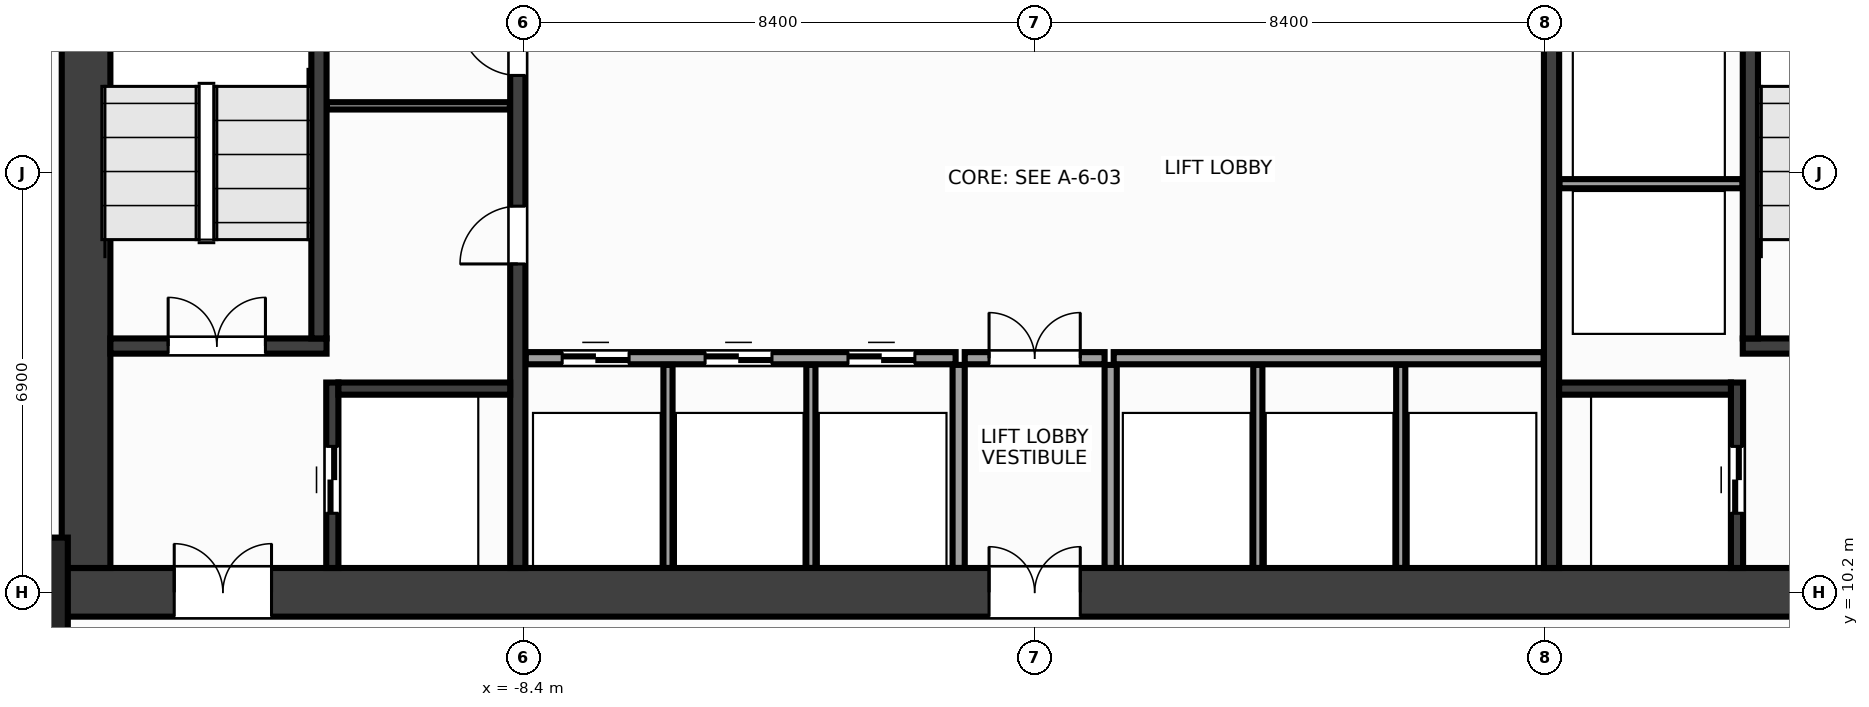
"""IFC4 building model, lengths in metres.
Left out: names, types, materials, properties, quantities, classifications, styles, units other than length and angle.
Written with IfcOpenShell. Run it as: python <this file> out.ifc"""

import sys

from ifc_helpers import new_model, si_unit, direction, frame, frame_2d, origin, origin_2d, place, context, subcontext, project, spatial, rectangle, extrude, source, transform, mapped, element, fill, save


model = new_model("IFC4")
c1 = context("Model", 3, precision=1e-05, world=origin(), true_north=direction((0.0, 1.0)))
c2 = subcontext(c1, "Body", "Model", "MODEL_VIEW")
j1 = project(units=[si_unit("LENGTHUNIT", "METRE"), si_unit("PLANEANGLEUNIT", "RADIAN")], contexts=[c1])
p1 = place(None, origin())
s1 = spatial("IfcSite", under=j1, at=p1, CompositionType="ELEMENT")
p2 = place(p1, origin())
s2 = spatial("IfcBuilding", under=s1, at=p2, CompositionType="ELEMENT")
p3 = place(p2, frame((0.0, 0.0, 59.6)))
s3 = spatial("IfcBuildingStorey", under=s2, at=p3, CompositionType="ELEMENT", Elevation=59.6)
m1 = source(origin(), c2, "Body", "SweptSolid", [
    extrude(rectangle(XDim=32.0, YDim=0.8, at=frame_2d((16.0, 0.0))), origin(), (0.0, 0.0, 1.0), 3.6),
])
p4 = place(p3, frame((-16.0, 10.2, 0.0), z_axis=(0.0, 0.0, 1.0), x_axis=(1.0, 0.0, 0.0)))
e1 = element("IfcWall", 1, at=p4, inside=s3, PredefinedType="SHEAR", context=c2, shape_type="MappedRepresentation", body=[
    mapped(m1, transform((0.0, 0.0, 0.0), x_axis=(1.0, 0.0, 0.0), y_axis=(0.0, 1.0, 0.0), z_axis=(0.0, 0.0, 1.0), scale=1.0)),
])
p5 = place(p4, frame((1.85, 0.0, 0.0)))
e2 = element("IfcOpeningElement", 2, at=p5, cuts=e1, PredefinedType="OPENING", context=c2, shape_type="SweptSolid", body=[
    extrude(rectangle(XDim=1.6, YDim=2.15, at=frame_2d((0.8, 1.075))), frame((0.0, 0.412, 0.0), z_axis=(0.0, -1.0, 0.0), x_axis=(1.0, 0.0, 0.0)), (0.0, 0.0, 1.0), 0.824),
])
p6 = place(p4, frame((28.55, 0.0, 0.0)))
e3 = element("IfcOpeningElement", 3, at=p6, cuts=e1, PredefinedType="OPENING", context=c2, shape_type="SweptSolid", body=[
    extrude(rectangle(XDim=1.6, YDim=2.15, at=frame_2d((0.8, 1.075))), frame((0.0, 0.412, 0.0), z_axis=(0.0, -1.0, 0.0), x_axis=(1.0, 0.0, 0.0)), (0.0, 0.0, 1.0), 0.824),
])
p7 = place(p4, frame((15.25, 0.0, 0.0)))
e4 = element("IfcOpeningElement", 4, at=p7, cuts=e1, PredefinedType="OPENING", context=c2, shape_type="SweptSolid", body=[
    extrude(rectangle(XDim=1.5, YDim=2.2, at=frame_2d((0.75, 1.1))), frame((0.0, 0.412, 0.0), z_axis=(0.0, -1.0, 0.0), x_axis=(1.0, 0.0, 0.0)), (0.0, 0.0, 1.0), 0.824),
])
m2 = source(origin(), c2, "Body", "SweptSolid", [
    extrude(rectangle(XDim=12.8, YDim=0.8, at=frame_2d((6.4, 0.0))), origin(), (0.0, 0.0, 1.0), 3.6),
])
p8 = place(p3, frame((-15.6, 10.6, 0.0), z_axis=(0.0, 0.0, 1.0), x_axis=(0.0, 1.0, 0.0)))
e5 = element("IfcWall", 5, at=p8, inside=s3, PredefinedType="SHEAR", context=c2, shape_type="MappedRepresentation", body=[
    mapped(m2, transform((0.0, 0.0, 0.0), x_axis=(1.0, 0.0, 0.0), y_axis=(0.0, 1.0, 0.0), z_axis=(0.0, 0.0, 1.0), scale=1.0)),
])
m3 = source(origin(), c2, "Body", "SweptSolid", [
    extrude(rectangle(XDim=12.8, YDim=0.25, at=frame_2d((6.4, 0.0))), origin(), (0.0, 0.0, 1.0), 3.6),
])
p9 = place(p3, frame((-8.5, 10.6, 0.0), z_axis=(0.0, 0.0, 1.0), x_axis=(0.0, 1.0, 0.0)))
e6 = element("IfcWall", 6, at=p9, inside=s3, PredefinedType="SHEAR", context=c2, shape_type="MappedRepresentation", body=[
    mapped(m3, transform((0.0, 0.0, 0.0), x_axis=(1.0, 0.0, 0.0), y_axis=(0.0, 1.0, 0.0), z_axis=(0.0, 0.0, 1.0), scale=1.0)),
])
p10 = place(p9, frame((5.0, 0.0, 0.0)))
e7 = element("IfcOpeningElement", 7, at=p10, cuts=e6, PredefinedType="OPENING", context=c2, shape_type="SweptSolid", body=[
    extrude(rectangle(XDim=0.95, YDim=2.15, at=frame_2d((0.475, 1.075))), frame((0.0, 0.137, 0.0), z_axis=(0.0, -1.0, 0.0), x_axis=(1.0, 0.0, 0.0)), (0.0, 0.0, 1.0), 0.274),
])
p11 = place(p9, frame((8.1, 0.0, 0.0)))
e8 = element("IfcOpeningElement", 8, at=p11, cuts=e6, PredefinedType="OPENING", context=c2, shape_type="SweptSolid", body=[
    extrude(rectangle(XDim=0.95, YDim=2.15, at=frame_2d((0.475, 1.075))), frame((0.0, 0.137, 0.0), z_axis=(0.0, -1.0, 0.0), x_axis=(1.0, 0.0, 0.0)), (0.0, 0.0, 1.0), 0.274),
])
p12 = place(p3, frame((8.5, 10.6, 0.0), z_axis=(0.0, 0.0, 1.0), x_axis=(0.0, 1.0, 0.0)))
e9 = element("IfcWall", 9, at=p12, inside=s3, PredefinedType="SHEAR", context=c2, shape_type="MappedRepresentation", body=[
    mapped(m3, transform((0.0, 0.0, 0.0), x_axis=(1.0, 0.0, 0.0), y_axis=(0.0, 1.0, 0.0), z_axis=(0.0, 0.0, 1.0), scale=1.0)),
])
p13 = place(p12, frame((9.85, 0.0, 0.0)))
e10 = element("IfcOpeningElement", 10, at=p13, cuts=e9, PredefinedType="OPENING", context=c2, shape_type="SweptSolid", body=[
    extrude(rectangle(XDim=0.95, YDim=2.15, at=frame_2d((0.475, 1.075))), frame((0.0, 0.137, 0.0), z_axis=(0.0, -1.0, 0.0), x_axis=(1.0, 0.0, 0.0)), (0.0, 0.0, 1.0), 0.274),
])
m4 = source(origin(), c2, "Body", "SweptSolid", [
    extrude(rectangle(XDim=3.555, YDim=0.25, at=frame_2d((1.777, 0.0))), origin(), (0.0, 0.0, 1.0), 3.6),
])
p14 = place(p3, frame((-15.2, 14.25, 0.0), z_axis=(0.0, 0.0, 1.0), x_axis=(1.0, 0.0, 0.0)))
e11 = element("IfcWall", 11, at=p14, inside=s3, PredefinedType="SHEAR", context=c2, shape_type="MappedRepresentation", body=[
    mapped(m4, transform((0.0, 0.0, 0.0), x_axis=(1.0, 0.0, 0.0), y_axis=(0.0, 1.0, 0.0), z_axis=(0.0, 0.0, 1.0), scale=1.0)),
])
p15 = place(p14, frame((0.95, 0.0, 0.0)))
e12 = element("IfcOpeningElement", 12, at=p15, cuts=e11, PredefinedType="OPENING", context=c2, shape_type="SweptSolid", body=[
    extrude(rectangle(XDim=1.6, YDim=2.15, at=frame_2d((0.8, 1.075))), frame((0.0, 0.137, 0.0), z_axis=(0.0, -1.0, 0.0), x_axis=(1.0, 0.0, 0.0)), (0.0, 0.0, 1.0), 0.274),
])
m5 = source(origin(), c2, "Body", "SweptSolid", [
    extrude(rectangle(XDim=9.025, YDim=0.25, at=frame_2d((4.512, 0.0))), origin(), (0.0, 0.0, 1.0), 3.6),
])
p16 = place(p3, frame((-11.77, 14.375, 0.0), z_axis=(0.0, 0.0, 1.0), x_axis=(0.0, 1.0, 0.0)))
e13 = element("IfcWall", 13, at=p16, inside=s3, PredefinedType="SHEAR", context=c2, shape_type="MappedRepresentation", body=[
    mapped(m5, transform((0.0, 0.0, 0.0), x_axis=(1.0, 0.0, 0.0), y_axis=(0.0, 1.0, 0.0), z_axis=(0.0, 0.0, 1.0), scale=1.0)),
])
p17 = place(p3, frame((11.645, 14.25, 0.0), z_axis=(0.0, 0.0, 1.0), x_axis=(1.0, 0.0, 0.0)))
e14 = element("IfcWall", 14, at=p17, inside=s3, PredefinedType="SHEAR", context=c2, shape_type="MappedRepresentation", body=[
    mapped(m4, transform((0.0, 0.0, 0.0), x_axis=(1.0, 0.0, 0.0), y_axis=(0.0, 1.0, 0.0), z_axis=(0.0, 0.0, 1.0), scale=1.0)),
])
p18 = place(p17, frame((0.95, 0.0, 0.0)))
e15 = element("IfcOpeningElement", 15, at=p18, cuts=e14, PredefinedType="OPENING", context=c2, shape_type="SweptSolid", body=[
    extrude(rectangle(XDim=1.6, YDim=2.15, at=frame_2d((0.8, 1.075))), frame((0.0, 0.137, 0.0), z_axis=(0.0, -1.0, 0.0), x_axis=(1.0, 0.0, 0.0)), (0.0, 0.0, 1.0), 0.274),
])
p19 = place(p3, frame((11.77, 14.375, 0.0), z_axis=(0.0, 0.0, 1.0), x_axis=(0.0, 1.0, 0.0)))
e16 = element("IfcWall", 16, at=p19, inside=s3, PredefinedType="SHEAR", context=c2, shape_type="MappedRepresentation", body=[
    mapped(m5, transform((0.0, 0.0, 0.0), x_axis=(1.0, 0.0, 0.0), y_axis=(0.0, 1.0, 0.0), z_axis=(0.0, 0.0, 1.0), scale=1.0)),
])
m6 = source(origin(), c2, "Body", "SweptSolid", [
    extrude(rectangle(XDim=3.05, YDim=0.2, at=frame_2d((1.525, 0.0))), origin(), (0.0, 0.0, 1.0), 3.6),
])
p20 = place(p3, frame((-11.55, 10.6, 0.0), z_axis=(0.0, 0.0, 1.0), x_axis=(0.0, 1.0, 0.0)))
e17 = element("IfcWall", 17, at=p20, inside=s3, PredefinedType="SHEAR", context=c2, shape_type="MappedRepresentation", body=[
    mapped(m6, transform((0.0, 0.0, 0.0), x_axis=(1.0, 0.0, 0.0), y_axis=(0.0, 1.0, 0.0), z_axis=(0.0, 0.0, 1.0), scale=1.0)),
])
p21 = place(p20, frame((0.9, 0.0, 0.0)))
e18 = element("IfcOpeningElement", 18, at=p21, cuts=e17, PredefinedType="OPENING", context=c2, shape_type="SweptSolid", body=[
    extrude(rectangle(XDim=1.1, YDim=2.15, at=frame_2d((0.55, 1.075))), frame((0.0, 0.112, 0.0), z_axis=(0.0, -1.0, 0.0), x_axis=(1.0, 0.0, 0.0)), (0.0, 0.0, 1.0), 0.224),
])
m7 = source(origin(), c2, "Body", "SweptSolid", [
    extrude(rectangle(XDim=2.825, YDim=0.2, at=frame_2d((1.413, 0.0))), origin(), (0.0, 0.0, 1.0), 3.6),
])
p22 = place(p3, frame((-11.45, 13.55, 0.0), z_axis=(0.0, 0.0, 1.0), x_axis=(1.0, 0.0, 0.0)))
e19 = element("IfcWall", 19, at=p22, inside=s3, PredefinedType="SHEAR", context=c2, shape_type="MappedRepresentation", body=[
    mapped(m7, transform((0.0, 0.0, 0.0), x_axis=(1.0, 0.0, 0.0), y_axis=(0.0, 1.0, 0.0), z_axis=(0.0, 0.0, 1.0), scale=1.0)),
])
p23 = place(p3, frame((11.55, 10.6, 0.0), z_axis=(0.0, 0.0, 1.0), x_axis=(0.0, 1.0, 0.0)))
e20 = element("IfcWall", 20, at=p23, inside=s3, PredefinedType="SHEAR", context=c2, shape_type="MappedRepresentation", body=[
    mapped(m6, transform((0.0, 0.0, 0.0), x_axis=(1.0, 0.0, 0.0), y_axis=(0.0, 1.0, 0.0), z_axis=(0.0, 0.0, 1.0), scale=1.0)),
])
p24 = place(p23, frame((0.9, 0.0, 0.0)))
e21 = element("IfcOpeningElement", 21, at=p24, cuts=e20, PredefinedType="OPENING", context=c2, shape_type="SweptSolid", body=[
    extrude(rectangle(XDim=1.1, YDim=2.15, at=frame_2d((0.55, 1.075))), frame((0.0, 0.112, 0.0), z_axis=(0.0, -1.0, 0.0), x_axis=(1.0, 0.0, 0.0)), (0.0, 0.0, 1.0), 0.224),
])
p25 = place(p3, frame((8.625, 13.55, 0.0), z_axis=(0.0, 0.0, 1.0), x_axis=(1.0, 0.0, 0.0)))
e22 = element("IfcWall", 22, at=p25, inside=s3, PredefinedType="SHEAR", context=c2, shape_type="MappedRepresentation", body=[
    mapped(m7, transform((0.0, 0.0, 0.0), x_axis=(1.0, 0.0, 0.0), y_axis=(0.0, 1.0, 0.0), z_axis=(0.0, 0.0, 1.0), scale=1.0)),
])
m8 = source(origin(), c2, "Body", "SweptSolid", [
    extrude(rectangle(XDim=1.8, YDim=1.8, at=origin_2d()), origin(), (0.0, 0.0, 1.0), 3.6),
])
p26 = place(p3, frame((-16.8, 10.2, 0.0), z_axis=(0.0, 0.0, 1.0), x_axis=(1.0, 0.0, 0.0)))
e23 = element("IfcColumn", 23, at=p26, inside=s3, PredefinedType="COLUMN", context=c2, shape_type="MappedRepresentation", body=[
    mapped(m8, transform((0.0, 0.0, 0.0), x_axis=(1.0, 0.0, 0.0), y_axis=(0.0, 1.0, 0.0), z_axis=(0.0, 0.0, 1.0), scale=1.0)),
])
m9 = source(origin(), c2, "Body", "SweptSolid", [
    extrude(rectangle(XDim=3.01, YDim=0.12, at=frame_2d((1.505, 0.0))), origin(), (0.0, 0.0, 1.0), 3.36),
])
p27 = place(p3, frame((-11.64, 18.2, 0.0), z_axis=(0.0, 0.0, 1.0), x_axis=(1.0, 0.0, 0.0)))
e24 = element("IfcWall", 24, at=p27, inside=s3, PredefinedType="PARTITIONING", context=c2, shape_type="MappedRepresentation", body=[
    mapped(m9, transform((0.0, 0.0, 0.0), x_axis=(1.0, 0.0, 0.0), y_axis=(0.0, 1.0, 0.0), z_axis=(0.0, 0.0, 1.0), scale=1.0)),
])
m10 = source(origin(), c2, "Body", "SweptSolid", [
    extrude(rectangle(XDim=3.01, YDim=0.15, at=frame_2d((1.505, 0.0))), origin(), (0.0, 0.0, 1.0), 3.36),
])
p28 = place(p3, frame((8.63, 16.92, 0.0), z_axis=(0.0, 0.0, 1.0), x_axis=(1.0, 0.0, 0.0)))
e25 = element("IfcWall", 25, at=p28, inside=s3, PredefinedType="PARTITIONING", context=c2, shape_type="MappedRepresentation", body=[
    mapped(m10, transform((0.0, 0.0, 0.0), x_axis=(1.0, 0.0, 0.0), y_axis=(0.0, 1.0, 0.0), z_axis=(0.0, 0.0, 1.0), scale=1.0)),
])
m11 = source(origin(), c2, "Body", "SweptSolid", [
    extrude(rectangle(XDim=7.07, YDim=0.2, at=frame_2d((3.535, 0.0))), origin(), (0.0, 0.0, 1.0), 3.36),
])
p29 = place(p3, frame((-8.37, 14.05, 0.0), z_axis=(0.0, 0.0, 1.0), x_axis=(1.0, 0.0, 0.0)))
e26 = element("IfcWall", 26, at=p29, inside=s3, PredefinedType="PARTITIONING", context=c2, shape_type="MappedRepresentation", body=[
    mapped(m11, transform((0.0, 0.0, 0.0), x_axis=(1.0, 0.0, 0.0), y_axis=(0.0, 1.0, 0.0), z_axis=(0.0, 0.0, 1.0), scale=1.0)),
])
p30 = place(p29, frame((0.6, 0.0, 0.0)))
e27 = element("IfcOpeningElement", 27, at=p30, cuts=e26, PredefinedType="OPENING", context=c2, shape_type="SweptSolid", body=[
    extrude(rectangle(XDim=1.1, YDim=2.15, at=frame_2d((0.55, 1.075))), frame((0.0, 0.112, 0.0), z_axis=(0.0, -1.0, 0.0), x_axis=(1.0, 0.0, 0.0)), (0.0, 0.0, 1.0), 0.224),
])
p31 = place(p29, frame((2.95, 0.0, 0.0)))
e28 = element("IfcOpeningElement", 28, at=p31, cuts=e26, PredefinedType="OPENING", context=c2, shape_type="SweptSolid", body=[
    extrude(rectangle(XDim=1.1, YDim=2.15, at=frame_2d((0.55, 1.075))), frame((0.0, 0.112, 0.0), z_axis=(0.0, -1.0, 0.0), x_axis=(1.0, 0.0, 0.0)), (0.0, 0.0, 1.0), 0.224),
])
p32 = place(p29, frame((5.3, 0.0, 0.0)))
e29 = element("IfcOpeningElement", 29, at=p32, cuts=e26, PredefinedType="OPENING", context=c2, shape_type="SweptSolid", body=[
    extrude(rectangle(XDim=1.1, YDim=2.15, at=frame_2d((0.55, 1.075))), frame((0.0, 0.112, 0.0), z_axis=(0.0, -1.0, 0.0), x_axis=(1.0, 0.0, 0.0)), (0.0, 0.0, 1.0), 0.224),
])
p33 = place(p3, frame((1.3, 14.05, 0.0), z_axis=(0.0, 0.0, 1.0), x_axis=(1.0, 0.0, 0.0)))
e30 = element("IfcWall", 30, at=p33, inside=s3, PredefinedType="PARTITIONING", context=c2, shape_type="MappedRepresentation", body=[
    mapped(m11, transform((0.0, 0.0, 0.0), x_axis=(1.0, 0.0, 0.0), y_axis=(0.0, 1.0, 0.0), z_axis=(0.0, 0.0, 1.0), scale=1.0)),
])
m12 = source(origin(), c2, "Body", "SweptSolid", [
    extrude(rectangle(XDim=3.34, YDim=0.2, at=frame_2d((1.67, 0.0))), origin(), (0.0, 0.0, 1.0), 3.36),
])
for number, where, z_axis, x_axis in (
    (31, (-1.25, 10.6, 0.0), (0.0, 0.0, 1.0), (0.0, 1.0, 0.0)),
    (32, (1.25, 10.6, 0.0), (0.0, 0.0, 1.0), (0.0, 1.0, 0.0)),
):
    element("IfcWall", number, at=place(p3, frame(where, z_axis=z_axis, x_axis=x_axis)), inside=s3, PredefinedType="PARTITIONING", context=c2, shape_type="MappedRepresentation", body=[
        mapped(m12, transform((0.0, 0.0, 0.0), x_axis=(1.0, 0.0, 0.0), y_axis=(0.0, 1.0, 0.0), z_axis=(0.0, 0.0, 1.0), scale=1.0)),
    ])
m13 = source(origin(), c2, "Body", "SweptSolid", [
    extrude(rectangle(XDim=2.3, YDim=0.2, at=frame_2d((1.15, 0.0))), origin(), (0.0, 0.0, 1.0), 3.36),
])
p34 = place(p3, frame((-1.15, 14.05, 0.0), z_axis=(0.0, 0.0, 1.0), x_axis=(1.0, 0.0, 0.0)))
e33 = element("IfcWall", 33, at=p34, inside=s3, PredefinedType="PARTITIONING", context=c2, shape_type="MappedRepresentation", body=[
    mapped(m13, transform((0.0, 0.0, 0.0), x_axis=(1.0, 0.0, 0.0), y_axis=(0.0, 1.0, 0.0), z_axis=(0.0, 0.0, 1.0), scale=1.0)),
])
p35 = place(p34, frame((0.4, 0.0, 0.0)))
e34 = element("IfcOpeningElement", 34, at=p35, cuts=e33, PredefinedType="OPENING", context=c2, shape_type="SweptSolid", body=[
    extrude(rectangle(XDim=1.5, YDim=2.2, at=frame_2d((0.75, 1.1))), frame((0.0, 0.112, 0.0), z_axis=(0.0, -1.0, 0.0), x_axis=(1.0, 0.0, 0.0)), (0.0, 0.0, 1.0), 0.224),
])
m14 = source(origin(), c2, "Body", "SweptSolid", [
    extrude(rectangle(XDim=3.34, YDim=0.15, at=frame_2d((1.67, 0.0))), origin(), (0.0, 0.0, 1.0), 3.36),
])
for number, where, z_axis, x_axis in (
    (35, (-6.03, 10.6, 0.0), (0.0, 0.0, 1.0), (0.0, 1.0, 0.0)),
    (36, (-3.68, 10.6, 0.0), (0.0, 0.0, 1.0), (0.0, 1.0, 0.0)),
    (37, (3.67, 10.6, 0.0), (0.0, 0.0, 1.0), (0.0, 1.0, 0.0)),
    (38, (6.02, 10.6, 0.0), (0.0, 0.0, 1.0), (0.0, 1.0, 0.0)),
):
    element("IfcWall", number, at=place(p3, frame(where, z_axis=z_axis, x_axis=x_axis)), inside=s3, PredefinedType="PARTITIONING", context=c2, shape_type="MappedRepresentation", body=[
        mapped(m14, transform((0.0, 0.0, 0.0), x_axis=(1.0, 0.0, 0.0), y_axis=(0.0, 1.0, 0.0), z_axis=(0.0, 0.0, 1.0), scale=1.0)),
    ])
m15 = source(origin(), c2, "Body", "SweptSolid", [
    extrude(rectangle(XDim=1.6, YDim=2.15, at=frame_2d((0.8, 1.075))), frame((0.0, 0.025, 0.0), z_axis=(0.0, -1.0, 0.0), x_axis=(1.0, 0.0, 0.0)), (0.0, 0.0, 1.0), 0.05),
])
p36 = place(p15, origin())
e39 = element("IfcDoor", 39, at=p36, inside=s3, OperationType="DOUBLE_DOOR_SINGLE_SWING", PredefinedType="DOOR", context=c2, shape_type="MappedRepresentation", body=[
    mapped(m15, transform((0.0, 0.0, 0.0), x_axis=(1.0, 0.0, 0.0), y_axis=(0.0, 1.0, 0.0), z_axis=(0.0, 0.0, 1.0), scale=1.0)),
])
fill(e12, e39)
p37 = place(p5, origin())
e40 = element("IfcDoor", 40, at=p37, inside=s3, OperationType="DOUBLE_DOOR_SINGLE_SWING", PredefinedType="DOOR", context=c2, shape_type="MappedRepresentation", body=[
    mapped(m15, transform((0.0, 0.0, 0.0), x_axis=(1.0, 0.0, 0.0), y_axis=(0.0, 1.0, 0.0), z_axis=(0.0, 0.0, 1.0), scale=1.0)),
])
fill(e2, e40)
m16 = source(origin(), c2, "Body", "SweptSolid", [
    extrude(rectangle(XDim=1.1, YDim=2.15, at=frame_2d((0.55, 1.075))), frame((0.0, 0.025, 0.0), z_axis=(0.0, -1.0, 0.0), x_axis=(1.0, 0.0, 0.0)), (0.0, 0.0, 1.0), 0.05),
])
p38 = place(p21, origin())
e41 = element("IfcDoor", 41, at=p38, inside=s3, OperationType="DOUBLE_DOOR_SLIDING", PredefinedType="DOOR", context=c2, shape_type="MappedRepresentation", body=[
    mapped(m16, transform((0.0, 0.0, 0.0), x_axis=(1.0, 0.0, 0.0), y_axis=(0.0, 1.0, 0.0), z_axis=(0.0, 0.0, 1.0), scale=1.0)),
])
fill(e18, e41)
p39 = place(p24, origin())
e42 = element("IfcDoor", 42, at=p39, inside=s3, OperationType="DOUBLE_DOOR_SLIDING", PredefinedType="DOOR", context=c2, shape_type="MappedRepresentation", body=[
    mapped(m16, transform((0.0, 0.0, 0.0), x_axis=(1.0, 0.0, 0.0), y_axis=(0.0, 1.0, 0.0), z_axis=(0.0, 0.0, 1.0), scale=1.0)),
])
fill(e21, e42)
m17 = source(origin(), c2, "Body", "SweptSolid", [
    extrude(rectangle(XDim=0.95, YDim=2.15, at=frame_2d((0.475, 1.075))), frame((0.0, 0.025, 0.0), z_axis=(0.0, -1.0, 0.0), x_axis=(1.0, 0.0, 0.0)), (0.0, 0.0, 1.0), 0.05),
])
p40 = place(p10, origin())
e43 = element("IfcDoor", 43, at=p40, inside=s3, OperationType="SINGLE_SWING_LEFT", PredefinedType="DOOR", context=c2, shape_type="MappedRepresentation", body=[
    mapped(m17, transform((0.0, 0.0, 0.0), x_axis=(1.0, 0.0, 0.0), y_axis=(0.0, 1.0, 0.0), z_axis=(0.0, 0.0, 1.0), scale=1.0)),
])
fill(e7, e43)
p41 = place(p11, origin())
e44 = element("IfcDoor", 44, at=p41, inside=s3, OperationType="SINGLE_SWING_RIGHT", PredefinedType="DOOR", context=c2, shape_type="MappedRepresentation", body=[
    mapped(m17, transform((0.0, 0.0, 0.0), x_axis=(1.0, 0.0, 0.0), y_axis=(0.0, 1.0, 0.0), z_axis=(0.0, 0.0, 1.0), scale=1.0)),
])
fill(e8, e44)
p42 = place(p30, origin())
e45 = element("IfcDoor", 45, at=p42, inside=s3, OperationType="DOUBLE_DOOR_SLIDING", PredefinedType="DOOR", context=c2, shape_type="MappedRepresentation", body=[
    mapped(m16, transform((0.0, 0.0, 0.0), x_axis=(1.0, 0.0, 0.0), y_axis=(0.0, 1.0, 0.0), z_axis=(0.0, 0.0, 1.0), scale=1.0)),
])
fill(e27, e45)
p43 = place(p31, origin())
e46 = element("IfcDoor", 46, at=p43, inside=s3, OperationType="DOUBLE_DOOR_SLIDING", PredefinedType="DOOR", context=c2, shape_type="MappedRepresentation", body=[
    mapped(m16, transform((0.0, 0.0, 0.0), x_axis=(1.0, 0.0, 0.0), y_axis=(0.0, 1.0, 0.0), z_axis=(0.0, 0.0, 1.0), scale=1.0)),
])
fill(e28, e46)
p44 = place(p32, origin())
e47 = element("IfcDoor", 47, at=p44, inside=s3, OperationType="DOUBLE_DOOR_SLIDING", PredefinedType="DOOR", context=c2, shape_type="MappedRepresentation", body=[
    mapped(m16, transform((0.0, 0.0, 0.0), x_axis=(1.0, 0.0, 0.0), y_axis=(0.0, 1.0, 0.0), z_axis=(0.0, 0.0, 1.0), scale=1.0)),
])
fill(e29, e47)
m18 = source(origin(), c2, "Body", "SweptSolid", [
    extrude(rectangle(XDim=1.5, YDim=2.2, at=frame_2d((0.75, 1.1))), frame((0.0, 0.025, 0.0), z_axis=(0.0, -1.0, 0.0), x_axis=(1.0, 0.0, 0.0)), (0.0, 0.0, 1.0), 0.05),
])
p45 = place(p35, origin())
e48 = element("IfcDoor", 48, at=p45, inside=s3, OperationType="DOUBLE_DOOR_SINGLE_SWING", PredefinedType="DOOR", context=c2, shape_type="MappedRepresentation", body=[
    mapped(m18, transform((0.0, 0.0, 0.0), x_axis=(1.0, 0.0, 0.0), y_axis=(0.0, 1.0, 0.0), z_axis=(0.0, 0.0, 1.0), scale=1.0)),
])
fill(e34, e48)
p46 = place(p7, origin())
e49 = element("IfcDoor", 49, at=p46, inside=s3, OperationType="DOUBLE_DOOR_SINGLE_SWING", PredefinedType="DOOR", context=c2, shape_type="MappedRepresentation", body=[
    mapped(m18, transform((0.0, 0.0, 0.0), x_axis=(1.0, 0.0, 0.0), y_axis=(0.0, 1.0, 0.0), z_axis=(0.0, 0.0, 1.0), scale=1.0)),
])
fill(e4, e49)
save(model, sys.argv[1])
